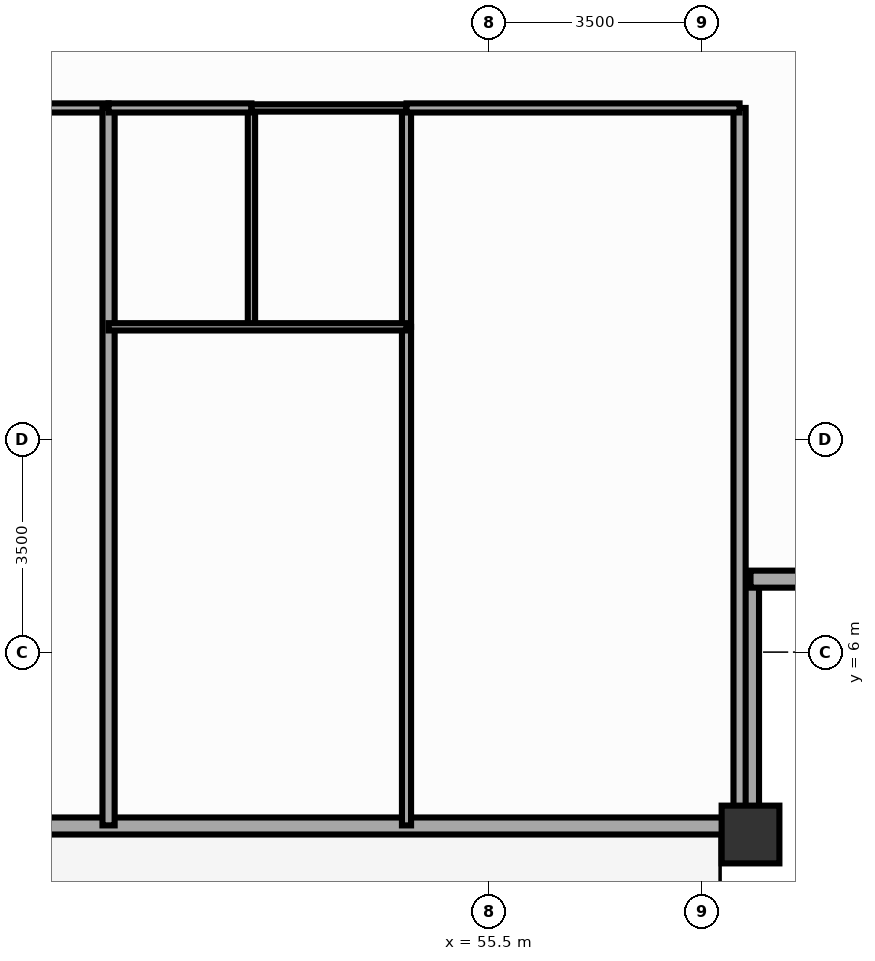
"""IFC4 building model, lengths in metres.
Left out: names, types, materials, properties, quantities, classifications, styles, units other than length and angle.
Written with IfcOpenShell. Run it as: python <this file> out.ifc"""

import sys

from ifc_helpers import new_model, si_unit, direction, frame, frame_2d, origin, origin_2d, place, context, subcontext, project, spatial, rectangle, extrude, source, transform, mapped, element, fill, save


model = new_model("IFC4")
c1 = context("Model", 3, precision=1e-05, world=origin(), true_north=direction((0.0, 1.0)))
c2 = subcontext(c1, "Body", "Model", "MODEL_VIEW")
j1 = project(units=[si_unit("LENGTHUNIT", "METRE"), si_unit("PLANEANGLEUNIT", "RADIAN")], contexts=[c1])
p1 = place(None, origin())
s1 = spatial("IfcSite", under=j1, at=p1, CompositionType="ELEMENT")
p2 = place(p1, origin())
s2 = spatial("IfcBuilding", under=s1, at=p2, CompositionType="ELEMENT")
p3 = place(p2, frame((0.0, 0.0, 74.35)))
s3 = spatial("IfcBuildingStorey", under=s2, at=p3, CompositionType="ELEMENT", Elevation=74.35)
m1 = source(origin(), c2, "Body", "SweptSolid", [
    extrude(rectangle(XDim=0.95, YDim=0.95, at=origin_2d()), origin(), (0.0, 0.0, 1.0), 3.5),
])
p4 = place(p3, frame((59.8, 3.0, 0.0), z_axis=(0.0, 0.0, 1.0), x_axis=(1.0, 0.0, 0.0)))
e1 = element("IfcColumn", 1, at=p4, inside=s3, PredefinedType="COLUMN", context=c2, shape_type="MappedRepresentation", body=[
    mapped(m1, transform((0.0, 0.0, 0.0), scale=1.0)),
])
p5 = place(p3, frame((16.2, 3.14, 0.0), z_axis=(0.0, 0.0, 1.0), x_axis=(1.0, 0.0, 0.0)))
e2 = element("IfcWall", 2, at=p5, inside=s3, PredefinedType="SOLIDWALL", context=c2, shape_type="SweptSolid", body=[
    extrude(rectangle(XDim=43.6, YDim=0.28, at=frame_2d((21.8, 0.0))), origin(), (0.0, 0.0, 1.0), 2.78),
])
p6 = place(p5, frame((1.798, 0.0, 0.85)))
e3 = element("IfcOpeningElement", 3, at=p6, cuts=e2, PredefinedType="OPENING", context=c2, shape_type="SweptSolid", body=[
    extrude(rectangle(XDim=1.8, YDim=1.65, at=frame_2d((0.9, 0.825))), frame((0.0, 0.152, 0.0), z_axis=(0.0, -1.0, 0.0), x_axis=(1.0, 0.0, 0.0)), (0.0, 0.0, 1.0), 0.304),
])
p7 = place(p5, frame((7.351, 0.0, 0.85)))
e4 = element("IfcOpeningElement", 4, at=p7, cuts=e2, PredefinedType="OPENING", context=c2, shape_type="SweptSolid", body=[
    extrude(rectangle(XDim=1.8, YDim=1.65, at=frame_2d((0.9, 0.825))), frame((0.0, 0.152, 0.0), z_axis=(0.0, -1.0, 0.0), x_axis=(1.0, 0.0, 0.0)), (0.0, 0.0, 1.0), 0.304),
])
p8 = place(p5, frame((12.304, 0.0, 0.85)))
e5 = element("IfcOpeningElement", 5, at=p8, cuts=e2, PredefinedType="OPENING", context=c2, shape_type="SweptSolid", body=[
    extrude(rectangle(XDim=1.8, YDim=1.65, at=frame_2d((0.9, 0.825))), frame((0.0, 0.152, 0.0), z_axis=(0.0, -1.0, 0.0), x_axis=(1.0, 0.0, 0.0)), (0.0, 0.0, 1.0), 0.304),
])
p9 = place(p5, frame((20.044, 0.0, 0.0), z_axis=(0.0, 0.0, 1.0), x_axis=(-1.0, 0.0, 0.0)))
e6 = element("IfcOpeningElement", 6, at=p9, cuts=e2, PredefinedType="OPENING", context=c2, shape_type="SweptSolid", body=[
    extrude(rectangle(XDim=1.1, YDim=2.15, at=frame_2d((0.55, 1.075))), frame((0.0, 0.152, 0.0), z_axis=(0.0, -1.0, 0.0), x_axis=(1.0, 0.0, 0.0)), (0.0, 0.0, 1.0), 0.304),
])
p10 = place(p5, frame((24.215, 0.0, 0.85)))
e7 = element("IfcOpeningElement", 7, at=p10, cuts=e2, PredefinedType="OPENING", context=c2, shape_type="SweptSolid", body=[
    extrude(rectangle(XDim=1.8, YDim=1.65, at=frame_2d((0.9, 0.825))), frame((0.0, 0.152, 0.0), z_axis=(0.0, -1.0, 0.0), x_axis=(1.0, 0.0, 0.0)), (0.0, 0.0, 1.0), 0.304),
])
p11 = place(p5, frame((29.929, 0.0, 0.85)))
e8 = element("IfcOpeningElement", 8, at=p11, cuts=e2, PredefinedType="OPENING", context=c2, shape_type="SweptSolid", body=[
    extrude(rectangle(XDim=1.8, YDim=1.65, at=frame_2d((0.9, 0.825))), frame((0.0, 0.152, 0.0), z_axis=(0.0, -1.0, 0.0), x_axis=(1.0, 0.0, 0.0)), (0.0, 0.0, 1.0), 0.304),
])
p12 = place(p5, frame((34.592, 0.0, 0.85)))
e9 = element("IfcOpeningElement", 9, at=p12, cuts=e2, PredefinedType="OPENING", context=c2, shape_type="SweptSolid", body=[
    extrude(rectangle(XDim=1.8, YDim=1.65, at=frame_2d((0.9, 0.825))), frame((0.0, 0.152, 0.0), z_axis=(0.0, -1.0, 0.0), x_axis=(1.0, 0.0, 0.0)), (0.0, 0.0, 1.0), 0.304),
])
p13 = place(p5, frame((39.714, 0.0, 0.85)))
e10 = element("IfcOpeningElement", 10, at=p13, cuts=e2, PredefinedType="OPENING", context=c2, shape_type="SweptSolid", body=[
    extrude(rectangle(XDim=1.8, YDim=1.65, at=frame_2d((0.9, 0.825))), frame((0.0, 0.152, 0.0), z_axis=(0.0, -1.0, 0.0), x_axis=(1.0, 0.0, 0.0)), (0.0, 0.0, 1.0), 0.304),
])
for number, where, z_axis, x_axis in (
    (11, (59.8, 3.08, 0.0), (0.0, 0.0, 1.0), (0.0, 1.0, 0.0)),
    (12, (59.8, 7.2, 0.0), (0.0, 0.0, 1.0), (1.0, 0.0, 0.0)),
):
    element("IfcWall", number, at=place(p3, frame(where, z_axis=z_axis, x_axis=x_axis)), inside=s3, PredefinedType="SOLIDWALL", context=c2, shape_type="SweptSolid", body=[
        extrude(rectangle(XDim=4.12, YDim=0.28, at=frame_2d((2.06, 0.0))), origin(), (0.0, 0.0, 1.0), 2.78),
    ])
p14 = place(p3, frame((59.62, 14.95, 0.0), z_axis=(0.0, 0.0, 1.0), x_axis=(0.0, -1.0, 0.0)))
e13 = element("IfcWall", 13, at=p14, inside=s3, PredefinedType="PARTITIONING", context=c2, shape_type="SweptSolid", body=[
    extrude(rectangle(XDim=11.8, YDim=0.2, at=frame_2d((5.9, 0.0))), origin(), (0.0, 0.0, 1.0), 3.29),
])
p15 = place(p3, frame((43.765, 14.95, 0.0), z_axis=(0.0, 0.0, 1.0), x_axis=(1.0, 0.0, 0.0)))
e14 = element("IfcWall", 14, at=p15, inside=s3, PredefinedType="PARTITIONING", context=c2, shape_type="SweptSolid", body=[
    extrude(rectangle(XDim=5.478, YDim=0.15, at=frame_2d((2.739, 0.0))), origin(), (0.0, 0.0, 1.0), 3.29),
])
p16 = place(p15, frame((2.028, 0.0, 0.0)))
e15 = element("IfcOpeningElement", 15, at=p16, cuts=e14, PredefinedType="OPENING", context=c2, shape_type="SweptSolid", body=[
    extrude(rectangle(XDim=1.1, YDim=2.15, at=frame_2d((0.55, 1.075))), frame((0.0, 0.087, 0.0), z_axis=(0.0, -1.0, 0.0), x_axis=(1.0, 0.0, 0.0)), (0.0, 0.0, 1.0), 0.174),
])
p17 = place(p3, frame((49.242, 14.95, 0.0), z_axis=(0.0, 0.0, 1.0), x_axis=(0.0, -1.0, 0.0)))
e16 = element("IfcWall", 16, at=p17, inside=s3, PredefinedType="PARTITIONING", context=c2, shape_type="SweptSolid", body=[
    extrude(rectangle(XDim=11.8, YDim=0.2, at=frame_2d((5.9, 0.0))), origin(), (0.0, 0.0, 1.0), 3.29),
])
p18 = place(p3, frame((51.592, 14.95, 0.0), z_axis=(0.0, 0.0, 1.0), x_axis=(0.0, -1.0, 0.0)))
e17 = element("IfcWall", 17, at=p18, inside=s3, PredefinedType="PARTITIONING", context=c2, shape_type="SweptSolid", body=[
    extrude(rectangle(XDim=3.6, YDim=0.12, at=frame_2d((1.8, 0.0))), origin(), (0.0, 0.0, 1.0), 3.29),
])
p19 = place(p3, frame((54.142, 14.95, 0.0), z_axis=(0.0, 0.0, 1.0), x_axis=(0.0, -1.0, 0.0)))
e18 = element("IfcWall", 18, at=p19, inside=s3, PredefinedType="PARTITIONING", context=c2, shape_type="SweptSolid", body=[
    extrude(rectangle(XDim=3.6, YDim=0.15, at=frame_2d((1.8, 0.0))), origin(), (0.0, 0.0, 1.0), 3.29),
])
p20 = place(p3, frame((54.142, 11.35, 0.0), z_axis=(0.0, 0.0, 1.0), x_axis=(0.0, -1.0, 0.0)))
e19 = element("IfcWall", 19, at=p20, inside=s3, PredefinedType="PARTITIONING", context=c2, shape_type="SweptSolid", body=[
    extrude(rectangle(XDim=8.2, YDim=0.15, at=frame_2d((4.1, 0.0))), origin(), (0.0, 0.0, 1.0), 3.29),
])
p21 = place(p20, frame((3.65, 0.0, 0.0)))
e20 = element("IfcOpeningElement", 20, at=p21, cuts=e19, PredefinedType="OPENING", context=c2, shape_type="SweptSolid", body=[
    extrude(rectangle(XDim=0.9, YDim=2.1, at=frame_2d((0.45, 1.05))), frame((0.0, 0.087, 0.0), z_axis=(0.0, -1.0, 0.0), x_axis=(1.0, 0.0, 0.0)), (0.0, 0.0, 1.0), 0.174),
])
p22 = place(p3, frame((49.242, 11.35, 0.0), z_axis=(0.0, 0.0, 1.0), x_axis=(1.0, 0.0, 0.0)))
e21 = element("IfcWall", 21, at=p22, inside=s3, PredefinedType="PARTITIONING", context=c2, shape_type="SweptSolid", body=[
    extrude(rectangle(XDim=4.9, YDim=0.12, at=frame_2d((2.45, 0.0))), origin(), (0.0, 0.0, 1.0), 3.29),
])
p23 = place(p3, frame((49.242, 14.95, 0.0), z_axis=(0.0, 0.0, 1.0), x_axis=(1.0, 0.0, 0.0)))
e22 = element("IfcWall", 22, at=p23, inside=s3, PredefinedType="PARTITIONING", context=c2, shape_type="SweptSolid", body=[
    extrude(rectangle(XDim=2.35, YDim=0.15, at=frame_2d((1.175, 0.0))), origin(), (0.0, 0.0, 1.0), 3.29),
])
p24 = place(p23, frame((0.725, 0.0, 0.0)))
e23 = element("IfcOpeningElement", 23, at=p24, cuts=e22, PredefinedType="OPENING", context=c2, shape_type="SweptSolid", body=[
    extrude(rectangle(XDim=0.9, YDim=2.1, at=frame_2d((0.45, 1.05))), frame((0.0, 0.087, 0.0), z_axis=(0.0, -1.0, 0.0), x_axis=(1.0, 0.0, 0.0)), (0.0, 0.0, 1.0), 0.174),
])
p25 = place(p3, frame((51.592, 14.95, 0.0), z_axis=(0.0, 0.0, 1.0), x_axis=(1.0, 0.0, 0.0)))
e24 = element("IfcWall", 24, at=p25, inside=s3, PredefinedType="PARTITIONING", context=c2, shape_type="SweptSolid", body=[
    extrude(rectangle(XDim=2.55, YDim=0.12, at=frame_2d((1.275, 0.0))), origin(), (0.0, 0.0, 1.0), 3.29),
])
p26 = place(p25, frame((0.775, 0.0, 0.0)))
e25 = element("IfcOpeningElement", 25, at=p26, cuts=e24, PredefinedType="OPENING", context=c2, shape_type="SweptSolid", body=[
    extrude(rectangle(XDim=1.0, YDim=2.1, at=frame_2d((0.5, 1.05))), frame((0.0, 0.072, 0.0), z_axis=(0.0, -1.0, 0.0), x_axis=(1.0, 0.0, 0.0)), (0.0, 0.0, 1.0), 0.144),
])
p27 = place(p3, frame((54.142, 14.95, 0.0), z_axis=(0.0, 0.0, 1.0), x_axis=(1.0, 0.0, 0.0)))
e26 = element("IfcWall", 26, at=p27, inside=s3, PredefinedType="PARTITIONING", context=c2, shape_type="SweptSolid", body=[
    extrude(rectangle(XDim=5.478, YDim=0.15, at=frame_2d((2.739, 0.0))), origin(), (0.0, 0.0, 1.0), 3.29),
])
p28 = place(p27, frame((2.028, 0.0, 0.0)))
e27 = element("IfcOpeningElement", 27, at=p28, cuts=e26, PredefinedType="OPENING", context=c2, shape_type="SweptSolid", body=[
    extrude(rectangle(XDim=1.1, YDim=2.15, at=frame_2d((0.55, 1.075))), frame((0.0, 0.087, 0.0), z_axis=(0.0, -1.0, 0.0), x_axis=(1.0, 0.0, 0.0)), (0.0, 0.0, 1.0), 0.174),
])
m2 = source(origin(), c2, "Body", "SweptSolid", [
    extrude(rectangle(XDim=1.8, YDim=1.65, at=frame_2d((0.9, 0.825))), frame((0.0, 0.03, 0.0), z_axis=(0.0, -1.0, 0.0), x_axis=(1.0, 0.0, 0.0)), (0.0, 0.0, 1.0), 0.06),
])
p29 = place(p12, origin())
e28 = element("IfcWindow", 28, at=p29, inside=s3, PartitioningType="SINGLE_PANEL", PredefinedType="WINDOW", context=c2, shape_type="MappedRepresentation", body=[
    mapped(m2, transform((0.0, 0.0, 0.0), scale=1.0)),
])
fill(e9, e28)
p30 = place(p13, origin())
e29 = element("IfcWindow", 29, at=p30, inside=s3, PartitioningType="SINGLE_PANEL", PredefinedType="WINDOW", context=c2, shape_type="MappedRepresentation", body=[
    mapped(m2, transform((0.0, 0.0, 0.0), scale=1.0)),
])
fill(e10, e29)
m3 = source(origin(), c2, "Body", "SweptSolid", [
    extrude(rectangle(XDim=0.9, YDim=2.1, at=frame_2d((0.45, 1.05))), frame((0.0, 0.025, 0.0), z_axis=(0.0, -1.0, 0.0), x_axis=(1.0, 0.0, 0.0)), (0.0, 0.0, 1.0), 0.05),
])
p31 = place(p21, origin())
e30 = element("IfcDoor", 30, at=p31, inside=s3, OperationType="SINGLE_SWING_RIGHT", PredefinedType="DOOR", context=c2, shape_type="MappedRepresentation", body=[
    mapped(m3, transform((0.0, 0.0, 0.0), scale=1.0)),
])
fill(e20, e30)
p32 = place(p24, origin())
e31 = element("IfcDoor", 31, at=p32, inside=s3, OperationType="SINGLE_SWING_LEFT", PredefinedType="DOOR", context=c2, shape_type="MappedRepresentation", body=[
    mapped(m3, transform((0.0, 0.0, 0.0), scale=1.0)),
])
fill(e23, e31)
m4 = source(origin(), c2, "Body", "SweptSolid", [
    extrude(rectangle(XDim=1.0, YDim=2.1, at=frame_2d((0.5, 1.05))), frame((0.0, 0.025, 0.0), z_axis=(0.0, -1.0, 0.0), x_axis=(1.0, 0.0, 0.0)), (0.0, 0.0, 1.0), 0.05),
])
p33 = place(p26, origin())
e32 = element("IfcDoor", 32, at=p33, inside=s3, OperationType="SINGLE_SWING_RIGHT", PredefinedType="DOOR", context=c2, shape_type="MappedRepresentation", body=[
    mapped(m4, transform((0.0, 0.0, 0.0), scale=1.0)),
])
fill(e25, e32)
m5 = source(origin(), c2, "Body", "SweptSolid", [
    extrude(rectangle(XDim=1.1, YDim=2.15, at=frame_2d((0.55, 1.075))), frame((0.0, 0.025, 0.0), z_axis=(0.0, -1.0, 0.0), x_axis=(1.0, 0.0, 0.0)), (0.0, 0.0, 1.0), 0.05),
])
p34 = place(p28, origin())
e33 = element("IfcDoor", 33, at=p34, inside=s3, OperationType="SINGLE_SWING_LEFT", PredefinedType="DOOR", context=c2, shape_type="MappedRepresentation", body=[
    mapped(m5, transform((0.0, 0.0, 0.0), scale=1.0)),
])
fill(e27, e33)
save(model, sys.argv[1])
